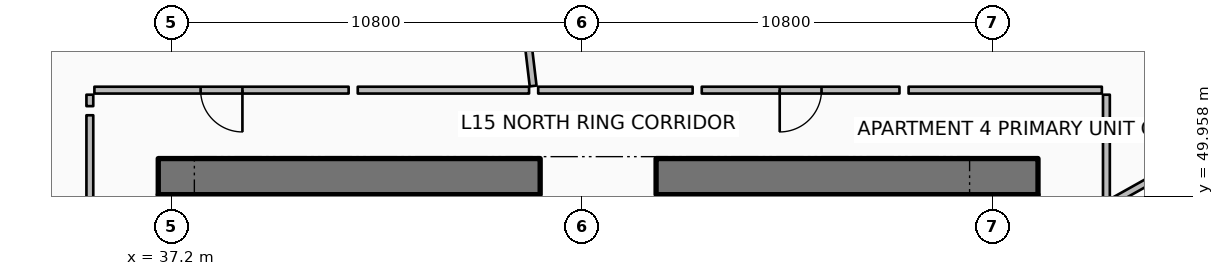
"""IFC4 building model, lengths in metres.
Left out: names, types, materials, properties, quantities, classifications, styles, units other than length and angle.
Written with IfcOpenShell. Run it as: python <this file> out.ifc"""

import sys

from ifc_helpers import new_model, si_unit, direction, frame, frame_2d, origin, place, context, subcontext, project, spatial, rectangle, extrude, element, fill, save


model = new_model("IFC4")
c1 = context("Model", 3, precision=1e-05, world=origin(), true_north=direction((0.0, 1.0)))
c2 = subcontext(c1, "Body", "Model", "MODEL_VIEW")
j1 = project(units=[si_unit("LENGTHUNIT", "METRE"), si_unit("PLANEANGLEUNIT", "RADIAN")], contexts=[c1])
p1 = place(None, origin())
s1 = spatial("IfcSite", under=j1, at=p1, CompositionType="ELEMENT")
p2 = place(p1, origin())
s2 = spatial("IfcBuilding", under=s1, at=p2, CompositionType="ELEMENT")
p3 = place(p2, frame((0.0, 0.0, 63.9)))
s3 = spatial("IfcBuildingStorey", under=s2, at=p3, CompositionType="ELEMENT", Elevation=63.9)
p4 = place(p3, frame((36.85, 50.475, 0.0), z_axis=(0.0, 0.0, 1.0), x_axis=(1.0, 0.0, 0.0)))
e1 = element("IfcWall", 1, at=p4, inside=s3, PredefinedType="SHEAR", context=c2, shape_type="SweptSolid", body=[
    extrude(rectangle(XDim=10.05, YDim=0.95, at=frame_2d((5.025, 0.0))), origin(), (0.0, 0.0, 1.0), 3.75),
])
p5 = place(p3, frame((49.95, 50.475, 0.0), z_axis=(0.0, 0.0, 1.0), x_axis=(1.0, 0.0, 0.0)))
e2 = element("IfcWall", 2, at=p5, inside=s3, PredefinedType="SHEAR", context=c2, shape_type="SweptSolid", body=[
    extrude(rectangle(XDim=10.05, YDim=0.95, at=frame_2d((5.025, 0.0))), origin(), (0.0, 0.0, 1.0), 3.75),
])
for number, where, z_axis, x_axis in (
    (3, (37.325, 34.0, 0.0), (0.0, 0.0, 1.0), (0.0, 1.0, 0.0)),
    (4, (59.525, 34.0, 0.0), (0.0, 0.0, 1.0), (0.0, 1.0, 0.0)),
):
    element("IfcWall", number, at=place(p3, frame(where, z_axis=z_axis, x_axis=x_axis)), inside=s3, PredefinedType="SHEAR", context=c2, shape_type="SweptSolid", body=[
        extrude(rectangle(XDim=16.0, YDim=0.95, at=frame_2d((8.0, 0.0))), origin(), (0.0, 0.0, 1.0), 3.75),
    ])
p6 = place(p3, frame((51.31, 46.5, 0.0), z_axis=(0.0, 0.0, 1.0), x_axis=(0.0, 1.0, 0.0)))
e5 = element("IfcWall", 5, at=p6, inside=s3, PredefinedType="SHEAR", context=c2, shape_type="SweptSolid", body=[
    extrude(rectangle(XDim=3.5, YDim=0.28, at=frame_2d((1.75, 0.0))), origin(), (0.0, 0.0, 1.0), 3.75),
])
p7 = place(p3, frame((61.896, 49.782, 0.0), z_axis=(0.0, 0.0, 1.0), x_axis=(0.872493215695, 0.488626225828, 0.0)))
e6 = element("IfcWall", 6, at=p7, inside=s3, PredefinedType="PARTITIONING", context=c2, shape_type="SweptSolid", body=[
    extrude(rectangle(XDim=15.612, YDim=0.18, at=frame_2d((7.806, 0.0))), origin(), (0.0, 0.0, 1.0), 2.867),
])
p8 = place(p3, frame((46.715, 52.859, 0.0), z_axis=(0.0, 0.0, 1.0), x_axis=(-0.117534950089, 0.993068746617, 0.0)))
e7 = element("IfcWall", 7, at=p8, inside=s3, PredefinedType="PARTITIONING", context=c2, shape_type="SweptSolid", body=[
    extrude(rectangle(XDim=14.661, YDim=0.18, at=frame_2d((7.33, 0.0))), origin(), (0.0, 0.0, 1.0), 2.867),
])
p9 = place(p3, frame((41.86, 52.75, 0.0), z_axis=(0.0, 0.0, 1.0), x_axis=(-1.0, 0.0, 0.0)))
e8 = element("IfcWall", 8, at=p9, inside=s3, PredefinedType="PARTITIONING", context=c2, shape_type="SweptSolid", body=[
    extrude(rectangle(XDim=6.69, YDim=0.18, at=frame_2d((3.345, 0.0))), origin(), (0.0, 0.0, 1.0), 2.867),
])
p10 = place(p9, frame((2.795, 0.0, 0.0)))
e9 = element("IfcOpeningElement", 9, at=p10, cuts=e8, PredefinedType="OPENING", context=c2, shape_type="SweptSolid", body=[
    extrude(rectangle(XDim=1.1, YDim=2.1, at=frame_2d((0.55, 1.05))), frame((0.0, 0.1, 0.0), z_axis=(0.0, -1.0, 0.0), x_axis=(1.0, 0.0, 0.0)), (0.0, 0.0, 1.0), 0.2),
])
p11 = place(p3, frame((35.05, 52.63, 0.0), z_axis=(0.0, 0.0, 1.0), x_axis=(0.0, -1.0, 0.0)))
e10 = element("IfcWall", 10, at=p11, inside=s3, PredefinedType="PARTITIONING", context=c2, shape_type="SweptSolid", body=[
    extrude(rectangle(XDim=0.301, YDim=0.18, at=frame_2d((0.15, 0.0))), origin(), (0.0, 0.0, 1.0), 2.867),
])
p12 = place(p3, frame((46.608, 52.75, 0.0), z_axis=(0.0, 0.0, 1.0), x_axis=(-1.0, 0.0, 0.0)))
e11 = element("IfcWall", 11, at=p12, inside=s3, PredefinedType="PARTITIONING", context=c2, shape_type="SweptSolid", body=[
    extrude(rectangle(XDim=4.508, YDim=0.18, at=frame_2d((2.254, 0.0))), origin(), (0.0, 0.0, 1.0), 2.867),
])
p13 = place(p3, frame((35.05, 52.089, 0.0), z_axis=(0.0, 0.0, 1.0), x_axis=(0.0, -1.0, 0.0)))
e12 = element("IfcWall", 12, at=p13, inside=s3, PredefinedType="PARTITIONING", context=c2, shape_type="SweptSolid", body=[
    extrude(rectangle(XDim=6.317, YDim=0.18, at=frame_2d((3.158, 0.0))), origin(), (0.0, 0.0, 1.0), 2.867),
])
p14 = place(p3, frame((56.354, 52.75, 0.0), z_axis=(0.0, 0.0, 1.0), x_axis=(-1.0, 0.0, 0.0)))
e13 = element("IfcWall", 13, at=p14, inside=s3, PredefinedType="PARTITIONING", context=c2, shape_type="SweptSolid", body=[
    extrude(rectangle(XDim=5.203, YDim=0.18, at=frame_2d((2.601, 0.0))), origin(), (0.0, 0.0, 1.0), 2.867),
])
p15 = place(p14, frame((2.052, 0.0, 0.0)))
e14 = element("IfcOpeningElement", 14, at=p15, cuts=e13, PredefinedType="OPENING", context=c2, shape_type="SweptSolid", body=[
    extrude(rectangle(XDim=1.1, YDim=2.1, at=frame_2d((0.55, 1.05))), frame((0.0, 0.1, 0.0), z_axis=(0.0, -1.0, 0.0), x_axis=(1.0, 0.0, 0.0)), (0.0, 0.0, 1.0), 0.2),
])
p16 = place(p3, frame((61.8, 49.848, 0.0), z_axis=(0.0, 0.0, 1.0), x_axis=(0.0, 1.0, 0.0)))
e15 = element("IfcWall", 15, at=p16, inside=s3, PredefinedType="PARTITIONING", context=c2, shape_type="SweptSolid", body=[
    extrude(rectangle(XDim=2.781, YDim=0.18, at=frame_2d((1.391, 0.0))), origin(), (0.0, 0.0, 1.0), 2.867),
])
p17 = place(p3, frame((61.68, 52.75, 0.0), z_axis=(0.0, 0.0, 1.0), x_axis=(-1.0, 0.0, 0.0)))
e16 = element("IfcWall", 16, at=p17, inside=s3, PredefinedType="PARTITIONING", context=c2, shape_type="SweptSolid", body=[
    extrude(rectangle(XDim=5.085, YDim=0.18, at=frame_2d((2.543, 0.0))), origin(), (0.0, 0.0, 1.0), 2.867),
])
p18 = place(p3, frame((50.912, 52.75, 0.0), z_axis=(0.0, 0.0, 1.0), x_axis=(-1.0, 0.0, 0.0)))
e17 = element("IfcWall", 17, at=p18, inside=s3, PredefinedType="PARTITIONING", context=c2, shape_type="SweptSolid", body=[
    extrude(rectangle(XDim=4.064, YDim=0.18, at=frame_2d((2.032, 0.0))), origin(), (0.0, 0.0, 1.0), 2.867),
])
p19 = place(p10, origin())
e18 = element("IfcDoor", 18, at=p19, inside=s3, OperationType="SINGLE_SWING_LEFT", PredefinedType="DOOR", context=c2, shape_type="SweptSolid", body=[
    extrude(rectangle(XDim=1.1, YDim=2.1, at=frame_2d((0.55, 1.05))), frame((0.0, 0.025, 0.0), z_axis=(0.0, -1.0, 0.0), x_axis=(1.0, 0.0, 0.0)), (0.0, 0.0, 1.0), 0.05),
])
fill(e9, e18)
p20 = place(p15, origin())
e19 = element("IfcDoor", 19, at=p20, inside=s3, OperationType="SINGLE_SWING_RIGHT", PredefinedType="DOOR", context=c2, shape_type="SweptSolid", body=[
    extrude(rectangle(XDim=1.1, YDim=2.1, at=frame_2d((0.55, 1.05))), frame((0.0, 0.025, 0.0), z_axis=(0.0, -1.0, 0.0), x_axis=(1.0, 0.0, 0.0)), (0.0, 0.0, 1.0), 0.05),
])
fill(e14, e19)
save(model, sys.argv[1])
